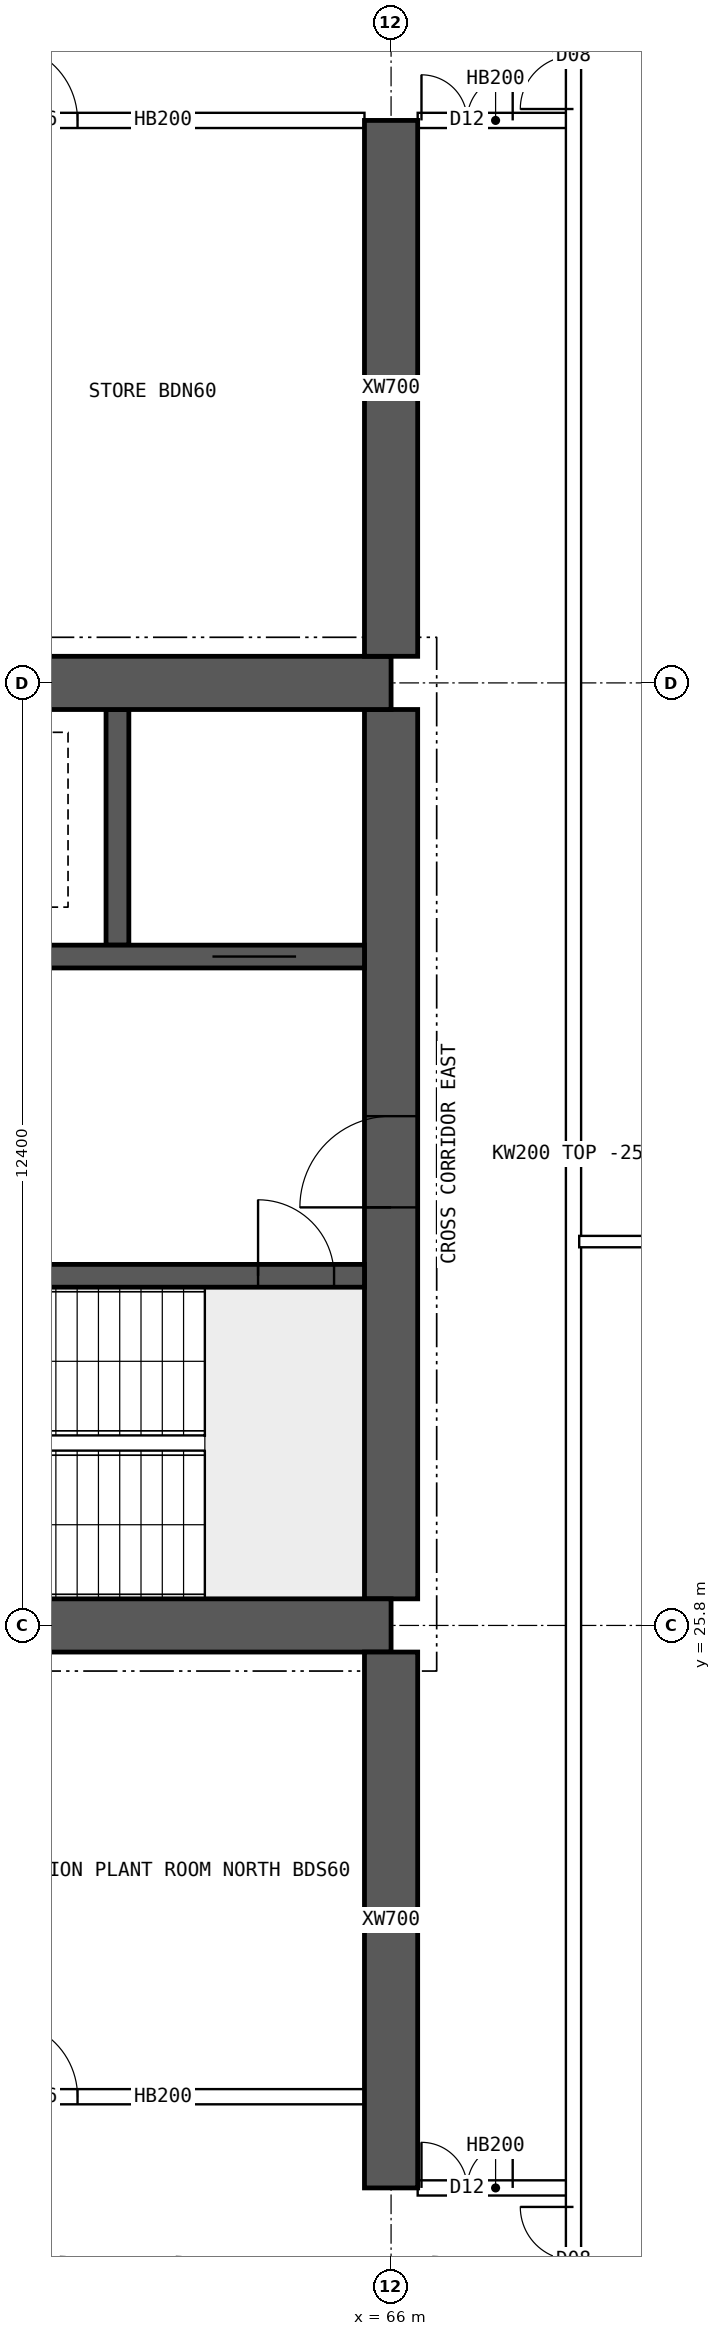
"""IFC4 building model, lengths in metres.
Left out: names, types, materials, properties, quantities, classifications, styles, units other than length and angle.
Written with IfcOpenShell. Run it as: python <this file> out.ifc"""

import sys

from ifc_helpers import new_model, si_unit, direction, frame, frame_2d, origin, place, context, subcontext, project, spatial, polyline, rectangle, outline, extrude, element, fill, save


model = new_model("IFC4")
c1 = context("Model", 3, precision=1e-05, world=origin(), true_north=direction((0.0, 1.0)))
c2 = subcontext(c1, "Body", "Model", "MODEL_VIEW")
j1 = project(units=[si_unit("LENGTHUNIT", "METRE"), si_unit("PLANEANGLEUNIT", "RADIAN")], contexts=[c1])
p1 = place(None, origin())
s1 = spatial("IfcSite", under=j1, at=p1, CompositionType="ELEMENT")
p2 = place(p1, origin())
s2 = spatial("IfcBuilding", under=s1, at=p2, CompositionType="ELEMENT")
p3 = place(p2, frame((0.0, 0.0, 235.3)))
s3 = spatial("IfcBuildingStorey", under=s2, at=p3, CompositionType="ELEMENT", Elevation=235.3)
for number, where, z_axis, x_axis in (
    (1, (18.0, 25.8, 0.0), (0.0, 0.0, 1.0), (1.0, 0.0, 0.0)),
    (2, (18.0, 38.2, 0.0), (0.0, 0.0, 1.0), (1.0, 0.0, 0.0)),
):
    element("IfcWall", number, at=place(p3, frame(where, z_axis=z_axis, x_axis=x_axis)), inside=s3, PredefinedType="SHEAR", context=c2, shape_type="SweptSolid", body=[
        extrude(rectangle(XDim=48.0, YDim=0.7, at=frame_2d((24.0, 0.0))), origin(), (0.0, 0.0, 1.0), 3.75),
    ])
p4 = place(p3, frame((66.0, 26.15, 0.0), z_axis=(0.0, 0.0, 1.0), x_axis=(0.0, 1.0, 0.0)))
e3 = element("IfcWall", 3, at=p4, inside=s3, PredefinedType="SHEAR", context=c2, shape_type="SweptSolid", body=[
    extrude(rectangle(XDim=11.7, YDim=0.7, at=frame_2d((5.85, 0.0))), origin(), (0.0, 0.0, 1.0), 3.75),
])
p5 = place(p4, frame((5.15, 0.0, 0.0)))
e4 = element("IfcOpeningElement", 4, at=p5, cuts=e3, PredefinedType="OPENING", context=c2, shape_type="SweptSolid", body=[
    extrude(rectangle(XDim=1.2, YDim=2.1, at=frame_2d((0.6, 1.05))), frame((0.0, 0.36, 0.0), z_axis=(0.0, -1.0, 0.0), x_axis=(1.0, 0.0, 0.0)), (0.0, 0.0, 1.0), 0.72),
])
p6 = place(p3, frame((18.35, 30.4, 0.0), z_axis=(0.0, 0.0, 1.0), x_axis=(1.0, 0.0, 0.0)))
e5 = element("IfcWall", 5, at=p6, inside=s3, PredefinedType="SHEAR", context=c2, shape_type="SweptSolid", body=[
    extrude(rectangle(XDim=47.3, YDim=0.3, at=frame_2d((23.65, 0.0))), origin(), (0.0, 0.0, 1.0), 3.75),
])
p7 = place(p6, frame((0.4, 0.0, 0.0)))
e6 = element("IfcOpeningElement", 6, at=p7, cuts=e5, PredefinedType="OPENING", context=c2, shape_type="SweptSolid", body=[
    extrude(rectangle(XDim=1.0, YDim=2.1, at=frame_2d((0.5, 1.05))), frame((0.0, 0.16, 0.0), z_axis=(0.0, -1.0, 0.0), x_axis=(1.0, 0.0, 0.0)), (0.0, 0.0, 1.0), 0.32),
])
p8 = place(p6, frame((45.9, 0.0, 0.0)))
e7 = element("IfcOpeningElement", 7, at=p8, cuts=e5, PredefinedType="OPENING", context=c2, shape_type="SweptSolid", body=[
    extrude(rectangle(XDim=1.0, YDim=2.1, at=frame_2d((0.5, 1.05))), frame((0.0, 0.16, 0.0), z_axis=(0.0, -1.0, 0.0), x_axis=(1.0, 0.0, 0.0)), (0.0, 0.0, 1.0), 0.32),
])
p9 = place(p6, frame((8.4, 0.0, 0.0)))
e8 = element("IfcOpeningElement", 8, at=p9, cuts=e5, PredefinedType="OPENING", context=c2, shape_type="SweptSolid", body=[
    extrude(rectangle(XDim=1.1, YDim=2.1, at=frame_2d((0.55, 1.05))), frame((0.0, 0.16, 0.0), z_axis=(0.0, -1.0, 0.0), x_axis=(1.0, 0.0, 0.0)), (0.0, 0.0, 1.0), 0.32),
])
p10 = place(p6, frame((11.0, 0.0, 0.0)))
e9 = element("IfcOpeningElement", 9, at=p10, cuts=e5, PredefinedType="OPENING", context=c2, shape_type="SweptSolid", body=[
    extrude(rectangle(XDim=1.1, YDim=2.1, at=frame_2d((0.55, 1.05))), frame((0.0, 0.16, 0.0), z_axis=(0.0, -1.0, 0.0), x_axis=(1.0, 0.0, 0.0)), (0.0, 0.0, 1.0), 0.32),
])
p11 = place(p6, frame((13.6, 0.0, 0.0)))
e10 = element("IfcOpeningElement", 10, at=p11, cuts=e5, PredefinedType="OPENING", context=c2, shape_type="SweptSolid", body=[
    extrude(rectangle(XDim=1.1, YDim=2.1, at=frame_2d((0.55, 1.05))), frame((0.0, 0.16, 0.0), z_axis=(0.0, -1.0, 0.0), x_axis=(1.0, 0.0, 0.0)), (0.0, 0.0, 1.0), 0.32),
])
p12 = place(p6, frame((16.2, 0.0, 0.0)))
e11 = element("IfcOpeningElement", 11, at=p12, cuts=e5, PredefinedType="OPENING", context=c2, shape_type="SweptSolid", body=[
    extrude(rectangle(XDim=1.1, YDim=2.1, at=frame_2d((0.55, 1.05))), frame((0.0, 0.16, 0.0), z_axis=(0.0, -1.0, 0.0), x_axis=(1.0, 0.0, 0.0)), (0.0, 0.0, 1.0), 0.32),
])
p13 = place(p6, frame((18.975, 0.0, 0.0)))
e12 = element("IfcOpeningElement", 12, at=p13, cuts=e5, PredefinedType="OPENING", context=c2, shape_type="SweptSolid", body=[
    extrude(rectangle(XDim=0.9, YDim=2.1, at=frame_2d((0.45, 1.05))), frame((0.0, 0.16, 0.0), z_axis=(0.0, -1.0, 0.0), x_axis=(1.0, 0.0, 0.0)), (0.0, 0.0, 1.0), 0.32),
])
p14 = place(p6, frame((24.475, 0.0, 0.0)))
e13 = element("IfcOpeningElement", 13, at=p14, cuts=e5, PredefinedType="OPENING", context=c2, shape_type="SweptSolid", body=[
    extrude(rectangle(XDim=0.9, YDim=2.1, at=frame_2d((0.45, 1.05))), frame((0.0, 0.16, 0.0), z_axis=(0.0, -1.0, 0.0), x_axis=(1.0, 0.0, 0.0)), (0.0, 0.0, 1.0), 0.32),
])
p15 = place(p6, frame((30.267, 0.0, 0.0)))
e14 = element("IfcOpeningElement", 14, at=p15, cuts=e5, PredefinedType="OPENING", context=c2, shape_type="SweptSolid", body=[
    extrude(rectangle(XDim=1.1, YDim=2.1, at=frame_2d((0.55, 1.05))), frame((0.0, 0.16, 0.0), z_axis=(0.0, -1.0, 0.0), x_axis=(1.0, 0.0, 0.0)), (0.0, 0.0, 1.0), 0.32),
])
p16 = place(p6, frame((33.8, 0.0, 0.0)))
e15 = element("IfcOpeningElement", 15, at=p16, cuts=e5, PredefinedType="OPENING", context=c2, shape_type="SweptSolid", body=[
    extrude(rectangle(XDim=1.1, YDim=2.1, at=frame_2d((0.55, 1.05))), frame((0.0, 0.16, 0.0), z_axis=(0.0, -1.0, 0.0), x_axis=(1.0, 0.0, 0.0)), (0.0, 0.0, 1.0), 0.32),
])
p17 = place(p6, frame((37.333, 0.0, 0.0)))
e16 = element("IfcOpeningElement", 16, at=p17, cuts=e5, PredefinedType="OPENING", context=c2, shape_type="SweptSolid", body=[
    extrude(rectangle(XDim=1.1, YDim=2.1, at=frame_2d((0.55, 1.05))), frame((0.0, 0.16, 0.0), z_axis=(0.0, -1.0, 0.0), x_axis=(1.0, 0.0, 0.0)), (0.0, 0.0, 1.0), 0.32),
])
p18 = place(p3, frame((18.35, 34.6, 0.0), z_axis=(0.0, 0.0, 1.0), x_axis=(1.0, 0.0, 0.0)))
e17 = element("IfcWall", 17, at=p18, inside=s3, PredefinedType="SHEAR", context=c2, shape_type="SweptSolid", body=[
    extrude(rectangle(XDim=47.3, YDim=0.3, at=frame_2d((23.65, 0.0))), origin(), (0.0, 0.0, 1.0), 3.75),
])
p19 = place(p18, frame((0.9, 0.0, 0.0)))
e18 = element("IfcOpeningElement", 18, at=p19, cuts=e17, PredefinedType="OPENING", context=c2, shape_type="SweptSolid", body=[
    extrude(rectangle(XDim=1.1, YDim=2.1, at=frame_2d((0.55, 1.05))), frame((0.0, 0.16, 0.0), z_axis=(0.0, -1.0, 0.0), x_axis=(1.0, 0.0, 0.0)), (0.0, 0.0, 1.0), 0.32),
])
p20 = place(p18, frame((45.3, 0.0, 0.0)))
e19 = element("IfcOpeningElement", 19, at=p20, cuts=e17, PredefinedType="OPENING", context=c2, shape_type="SweptSolid", body=[
    extrude(rectangle(XDim=1.1, YDim=2.1, at=frame_2d((0.55, 1.05))), frame((0.0, 0.16, 0.0), z_axis=(0.0, -1.0, 0.0), x_axis=(1.0, 0.0, 0.0)), (0.0, 0.0, 1.0), 0.32),
])
p21 = place(p18, frame((4.25, 0.0, 0.0)))
e20 = element("IfcOpeningElement", 20, at=p21, cuts=e17, PredefinedType="OPENING", context=c2, shape_type="SweptSolid", body=[
    extrude(rectangle(XDim=0.9, YDim=2.1, at=frame_2d((0.45, 1.05))), frame((0.0, 0.16, 0.0), z_axis=(0.0, -1.0, 0.0), x_axis=(1.0, 0.0, 0.0)), (0.0, 0.0, 1.0), 0.32),
])
p22 = place(p18, frame((42.15, 0.0, 0.0)))
e21 = element("IfcOpeningElement", 21, at=p22, cuts=e17, PredefinedType="OPENING", context=c2, shape_type="SweptSolid", body=[
    extrude(rectangle(XDim=0.9, YDim=2.1, at=frame_2d((0.45, 1.05))), frame((0.0, 0.16, 0.0), z_axis=(0.0, -1.0, 0.0), x_axis=(1.0, 0.0, 0.0)), (0.0, 0.0, 1.0), 0.32),
])
p23 = place(p18, frame((9.025, 0.0, 0.0)))
e22 = element("IfcOpeningElement", 22, at=p23, cuts=e17, PredefinedType="OPENING", context=c2, shape_type="SweptSolid", body=[
    extrude(rectangle(XDim=0.9, YDim=2.1, at=frame_2d((0.45, 1.05))), frame((0.0, 0.16, 0.0), z_axis=(0.0, -1.0, 0.0), x_axis=(1.0, 0.0, 0.0)), (0.0, 0.0, 1.0), 0.32),
])
p24 = place(p18, frame((12.999, 0.0, 0.0)))
e23 = element("IfcOpeningElement", 23, at=p24, cuts=e17, PredefinedType="OPENING", context=c2, shape_type="SweptSolid", body=[
    extrude(rectangle(XDim=0.9, YDim=2.1, at=frame_2d((0.45, 1.05))), frame((0.0, 0.16, 0.0), z_axis=(0.0, -1.0, 0.0), x_axis=(1.0, 0.0, 0.0)), (0.0, 0.0, 1.0), 0.32),
])
p25 = place(p18, frame((16.646, 0.0, 0.0)))
e24 = element("IfcOpeningElement", 24, at=p25, cuts=e17, PredefinedType="OPENING", context=c2, shape_type="SweptSolid", body=[
    extrude(rectangle(XDim=0.9, YDim=2.1, at=frame_2d((0.45, 1.05))), frame((0.0, 0.16, 0.0), z_axis=(0.0, -1.0, 0.0), x_axis=(1.0, 0.0, 0.0)), (0.0, 0.0, 1.0), 0.32),
])
p26 = place(p18, frame((20.405, 0.0, 0.0)))
e25 = element("IfcOpeningElement", 25, at=p26, cuts=e17, PredefinedType="OPENING", context=c2, shape_type="SweptSolid", body=[
    extrude(rectangle(XDim=0.9, YDim=2.1, at=frame_2d((0.45, 1.05))), frame((0.0, 0.16, 0.0), z_axis=(0.0, -1.0, 0.0), x_axis=(1.0, 0.0, 0.0)), (0.0, 0.0, 1.0), 0.32),
])
p27 = place(p18, frame((24.811, 0.0, 0.0)))
e26 = element("IfcOpeningElement", 26, at=p27, cuts=e17, PredefinedType="OPENING", context=c2, shape_type="SweptSolid", body=[
    extrude(rectangle(XDim=0.9, YDim=2.1, at=frame_2d((0.45, 1.05))), frame((0.0, 0.16, 0.0), z_axis=(0.0, -1.0, 0.0), x_axis=(1.0, 0.0, 0.0)), (0.0, 0.0, 1.0), 0.32),
])
p28 = place(p18, frame((27.608, 0.0, 0.0)))
e27 = element("IfcOpeningElement", 27, at=p28, cuts=e17, PredefinedType="OPENING", context=c2, shape_type="SweptSolid", body=[
    extrude(rectangle(XDim=0.9, YDim=2.1, at=frame_2d((0.45, 1.05))), frame((0.0, 0.16, 0.0), z_axis=(0.0, -1.0, 0.0), x_axis=(1.0, 0.0, 0.0)), (0.0, 0.0, 1.0), 0.32),
])
p29 = place(p18, frame((30.791, 0.0, 0.0)))
e28 = element("IfcOpeningElement", 28, at=p29, cuts=e17, PredefinedType="OPENING", context=c2, shape_type="SweptSolid", body=[
    extrude(rectangle(XDim=0.9, YDim=2.1, at=frame_2d((0.45, 1.05))), frame((0.0, 0.16, 0.0), z_axis=(0.0, -1.0, 0.0), x_axis=(1.0, 0.0, 0.0)), (0.0, 0.0, 1.0), 0.32),
])
p30 = place(p18, frame((34.742, 0.0, 0.0)))
e29 = element("IfcOpeningElement", 29, at=p30, cuts=e17, PredefinedType="OPENING", context=c2, shape_type="SweptSolid", body=[
    extrude(rectangle(XDim=0.9, YDim=2.1, at=frame_2d((0.45, 1.05))), frame((0.0, 0.16, 0.0), z_axis=(0.0, -1.0, 0.0), x_axis=(1.0, 0.0, 0.0)), (0.0, 0.0, 1.0), 0.32),
])
p31 = place(p18, frame((37.68, 0.0, 0.0)))
e30 = element("IfcOpeningElement", 30, at=p31, cuts=e17, PredefinedType="OPENING", context=c2, shape_type="SweptSolid", body=[
    extrude(rectangle(XDim=0.9, YDim=2.1, at=frame_2d((0.45, 1.05))), frame((0.0, 0.16, 0.0), z_axis=(0.0, -1.0, 0.0), x_axis=(1.0, 0.0, 0.0)), (0.0, 0.0, 1.0), 0.32),
])
p32 = place(p3, frame((62.4, 34.75, 0.0), z_axis=(0.0, 0.0, 1.0), x_axis=(0.0, 1.0, 0.0)))
e31 = element("IfcWall", 31, at=p32, inside=s3, PredefinedType="SHEAR", context=c2, shape_type="SweptSolid", body=[
    extrude(rectangle(XDim=3.1, YDim=0.3, at=frame_2d((1.55, 0.0))), origin(), (0.0, 0.0, 1.0), 3.75),
])
for number, where, z_axis, x_axis in (
    (32, (66.0, 18.4, 0.0), (0.0, 0.0, 1.0), (0.0, 1.0, 0.0)),
    (33, (66.0, 38.55, 0.0), (0.0, 0.0, 1.0), (0.0, 1.0, 0.0)),
):
    element("IfcWall", number, at=place(p3, frame(where, z_axis=z_axis, x_axis=x_axis)), inside=s3, PredefinedType="SHEAR", context=c2, shape_type="SweptSolid", body=[
        extrude(rectangle(XDim=7.05, YDim=0.7, at=frame_2d((3.525, 0.0))), origin(), (0.0, 0.0, 1.0), 3.75),
    ])
p33 = place(p3, frame((66.35, 18.4, 0.0), z_axis=(0.0, 0.0, 1.0), x_axis=(1.0, 0.0, 0.0)))
e34 = element("IfcWall", 34, at=p33, inside=s3, PredefinedType="SOLIDWALL", context=c2, shape_type="SweptSolid", body=[
    extrude(rectangle(XDim=2.05, YDim=0.2, at=frame_2d((1.025, 0.0))), origin(), (0.0, 0.0, 1.0), 3.5),
])
p34 = place(p33, frame((0.05, 0.0, 0.0)))
e35 = element("IfcOpeningElement", 35, at=p34, cuts=e34, PredefinedType="OPENING", context=c2, shape_type="SweptSolid", body=[
    extrude(rectangle(XDim=1.2, YDim=2.1, at=frame_2d((0.6, 1.05))), frame((0.0, 0.11, 0.0), z_axis=(0.0, -1.0, 0.0), x_axis=(1.0, 0.0, 0.0)), (0.0, 0.0, 1.0), 0.22),
])
p35 = place(p3, frame((60.35, 45.6, 0.0), z_axis=(0.0, 0.0, 1.0), x_axis=(1.0, 0.0, 0.0)))
e36 = element("IfcWall", 36, at=p35, inside=s3, PredefinedType="SOLIDWALL", context=c2, shape_type="SweptSolid", body=[
    extrude(rectangle(XDim=5.3, YDim=0.2, at=frame_2d((2.65, 0.0))), origin(), (0.0, 0.0, 1.0), 3.5),
])
p36 = place(p35, frame((0.525, 0.0, 0.0)))
e37 = element("IfcOpeningElement", 37, at=p36, cuts=e36, PredefinedType="OPENING", context=c2, shape_type="SweptSolid", body=[
    extrude(rectangle(XDim=1.0, YDim=2.1, at=frame_2d((0.5, 1.05))), frame((0.0, 0.11, 0.0), z_axis=(0.0, -1.0, 0.0), x_axis=(1.0, 0.0, 0.0)), (0.0, 0.0, 1.0), 0.22),
])
p37 = place(p3, frame((66.35, 45.6, 0.0), z_axis=(0.0, 0.0, 1.0), x_axis=(1.0, 0.0, 0.0)))
e38 = element("IfcWall", 38, at=p37, inside=s3, PredefinedType="SOLIDWALL", context=c2, shape_type="SweptSolid", body=[
    extrude(rectangle(XDim=2.05, YDim=0.2, at=frame_2d((1.025, 0.0))), origin(), (0.0, 0.0, 1.0), 3.5),
])
p38 = place(p37, frame((0.05, 0.0, 0.0)))
e39 = element("IfcOpeningElement", 39, at=p38, cuts=e38, PredefinedType="OPENING", context=c2, shape_type="SweptSolid", body=[
    extrude(rectangle(XDim=1.2, YDim=2.1, at=frame_2d((0.6, 1.05))), frame((0.0, 0.11, 0.0), z_axis=(0.0, -1.0, 0.0), x_axis=(1.0, 0.0, 0.0)), (0.0, 0.0, 1.0), 0.22),
])
p39 = place(p3, frame((60.35, 19.6, 0.0), z_axis=(0.0, 0.0, 1.0), x_axis=(1.0, 0.0, 0.0)))
e40 = element("IfcWall", 40, at=p39, inside=s3, PredefinedType="SOLIDWALL", context=c2, shape_type="SweptSolid", body=[
    extrude(rectangle(XDim=5.3, YDim=0.2, at=frame_2d((2.65, 0.0))), origin(), (0.0, 0.0, 1.0), 3.5),
])
p40 = place(p39, frame((0.525, 0.0, 0.0)))
e41 = element("IfcOpeningElement", 41, at=p40, cuts=e40, PredefinedType="OPENING", context=c2, shape_type="SweptSolid", body=[
    extrude(rectangle(XDim=1.0, YDim=2.1, at=frame_2d((0.5, 1.05))), frame((0.0, 0.11, 0.0), z_axis=(0.0, -1.0, 0.0), x_axis=(1.0, 0.0, 0.0)), (0.0, 0.0, 1.0), 0.22),
])
p41 = place(p3, frame((68.475, 30.85, 0.0), z_axis=(0.0, 0.0, 1.0), x_axis=(1.0, 0.0, 0.0)))
e42 = element("IfcWall", 42, at=p41, inside=s3, PredefinedType="PARTITIONING", context=c2, shape_type="SweptSolid", body=[
    extrude(outline(polyline([(0.0, 0.0), (6.82, 0.0), (6.82, 3.5), (3.827, 3.5), (3.825, 3.05), (3.227, 3.05), (3.225, 3.5), (0.0, 3.5), (0.0, 0.0)])), frame((0.0, 0.075, 0.0), z_axis=(0.0, -1.0, 0.0), x_axis=(1.0, 0.0, 0.0)), (0.0, 0.0, 1.0), 0.15),
])
p42 = place(p3, frame((68.4, 11.646, 0.0), z_axis=(0.0, 0.0, 1.0), x_axis=(0.0, 1.0, 0.0)))
e43 = element("IfcWall", 43, at=p42, inside=s3, PredefinedType="SOLIDWALL", context=c2, shape_type="SweptSolid", body=[
    extrude(rectangle(XDim=40.708, YDim=0.2, at=frame_2d((20.354, 0.0))), origin(), (0.0, 0.0, 1.0), 3.5),
])
p43 = place(p42, frame((5.104, 0.0, 0.0)))
e44 = element("IfcOpeningElement", 44, at=p43, cuts=e43, PredefinedType="OPENING", context=c2, shape_type="SweptSolid", body=[
    extrude(rectangle(XDim=1.4, YDim=2.1, at=frame_2d((0.7, 1.05))), frame((0.0, 0.11, 0.0), z_axis=(0.0, -1.0, 0.0), x_axis=(1.0, 0.0, 0.0)), (0.0, 0.0, 1.0), 0.22),
])
p44 = place(p42, frame((34.104, 0.0, 0.0)))
e45 = element("IfcOpeningElement", 45, at=p44, cuts=e43, PredefinedType="OPENING", context=c2, shape_type="SweptSolid", body=[
    extrude(rectangle(XDim=1.4, YDim=2.1, at=frame_2d((0.7, 1.05))), frame((0.0, 0.11, 0.0), z_axis=(0.0, -1.0, 0.0), x_axis=(1.0, 0.0, 0.0)), (0.0, 0.0, 1.0), 0.22),
])
p45 = place(p5, origin())
e46 = element("IfcDoor", 46, at=p45, inside=s3, OperationType="SINGLE_SWING_LEFT", PredefinedType="DOOR", context=c2, shape_type="SweptSolid", body=[
    extrude(rectangle(XDim=1.2, YDim=2.1, at=frame_2d((0.6, 1.05))), frame((0.0, 0.025, 0.0), z_axis=(0.0, -1.0, 0.0), x_axis=(1.0, 0.0, 0.0)), (0.0, 0.0, 1.0), 0.05),
])
fill(e4, e46)
p46 = place(p8, origin())
e47 = element("IfcDoor", 47, at=p46, inside=s3, OperationType="SINGLE_SWING_LEFT", PredefinedType="DOOR", context=c2, shape_type="SweptSolid", body=[
    extrude(rectangle(XDim=1.0, YDim=2.1, at=frame_2d((0.5, 1.05))), frame((0.0, 0.025, 0.0), z_axis=(0.0, -1.0, 0.0), x_axis=(1.0, 0.0, 0.0)), (0.0, 0.0, 1.0), 0.05),
])
fill(e7, e47)
p47 = place(p20, origin())
e48 = element("IfcDoor", 48, at=p47, inside=s3, OperationType="DOUBLE_DOOR_SLIDING", PredefinedType="DOOR", context=c2, shape_type="SweptSolid", body=[
    extrude(rectangle(XDim=1.1, YDim=2.1, at=frame_2d((0.55, 1.05))), frame((0.0, 0.025, 0.0), z_axis=(0.0, -1.0, 0.0), x_axis=(1.0, 0.0, 0.0)), (0.0, 0.0, 1.0), 0.05),
])
fill(e19, e48)
p48 = place(p34, origin())
e49 = element("IfcDoor", 49, at=p48, inside=s3, OperationType="DOUBLE_DOOR_SINGLE_SWING", PredefinedType="DOOR", context=c2, shape_type="SweptSolid", body=[
    extrude(rectangle(XDim=1.2, YDim=2.1, at=frame_2d((0.6, 1.05))), frame((0.0, 0.025, 0.0), z_axis=(0.0, -1.0, 0.0), x_axis=(1.0, 0.0, 0.0)), (0.0, 0.0, 1.0), 0.05),
])
fill(e35, e49)
p49 = place(p38, origin())
e50 = element("IfcDoor", 50, at=p49, inside=s3, OperationType="DOUBLE_DOOR_SINGLE_SWING", PredefinedType="DOOR", context=c2, shape_type="SweptSolid", body=[
    extrude(rectangle(XDim=1.2, YDim=2.1, at=frame_2d((0.6, 1.05))), frame((0.0, 0.025, 0.0), z_axis=(0.0, -1.0, 0.0), x_axis=(1.0, 0.0, 0.0)), (0.0, 0.0, 1.0), 0.05),
])
fill(e39, e50)
p50 = place(p40, origin())
e51 = element("IfcDoor", 51, at=p50, inside=s3, OperationType="SINGLE_SWING_LEFT", PredefinedType="DOOR", context=c2, shape_type="SweptSolid", body=[
    extrude(rectangle(XDim=1.0, YDim=2.1, at=frame_2d((0.5, 1.05))), frame((0.0, 0.025, 0.0), z_axis=(0.0, -1.0, 0.0), x_axis=(1.0, 0.0, 0.0)), (0.0, 0.0, 1.0), 0.05),
])
fill(e41, e51)
p51 = place(p36, origin())
e52 = element("IfcDoor", 52, at=p51, inside=s3, OperationType="SINGLE_SWING_LEFT", PredefinedType="DOOR", context=c2, shape_type="SweptSolid", body=[
    extrude(rectangle(XDim=1.0, YDim=2.1, at=frame_2d((0.5, 1.05))), frame((0.0, 0.025, 0.0), z_axis=(0.0, -1.0, 0.0), x_axis=(1.0, 0.0, 0.0)), (0.0, 0.0, 1.0), 0.05),
])
fill(e37, e52)
p52 = place(p43, origin())
e53 = element("IfcDoor", 53, at=p52, inside=s3, OperationType="DOUBLE_DOOR_SINGLE_SWING", PredefinedType="DOOR", context=c2, shape_type="SweptSolid", body=[
    extrude(rectangle(XDim=1.4, YDim=2.1, at=frame_2d((0.7, 1.05))), frame((0.0, 0.025, 0.0), z_axis=(0.0, -1.0, 0.0), x_axis=(1.0, 0.0, 0.0)), (0.0, 0.0, 1.0), 0.05),
])
fill(e44, e53)
p53 = place(p44, origin())
e54 = element("IfcDoor", 54, at=p53, inside=s3, OperationType="DOUBLE_DOOR_SINGLE_SWING", PredefinedType="DOOR", context=c2, shape_type="SweptSolid", body=[
    extrude(rectangle(XDim=1.4, YDim=2.1, at=frame_2d((0.7, 1.05))), frame((0.0, 0.025, 0.0), z_axis=(0.0, -1.0, 0.0), x_axis=(1.0, 0.0, 0.0)), (0.0, 0.0, 1.0), 0.05),
])
fill(e45, e54)
save(model, sys.argv[1])
